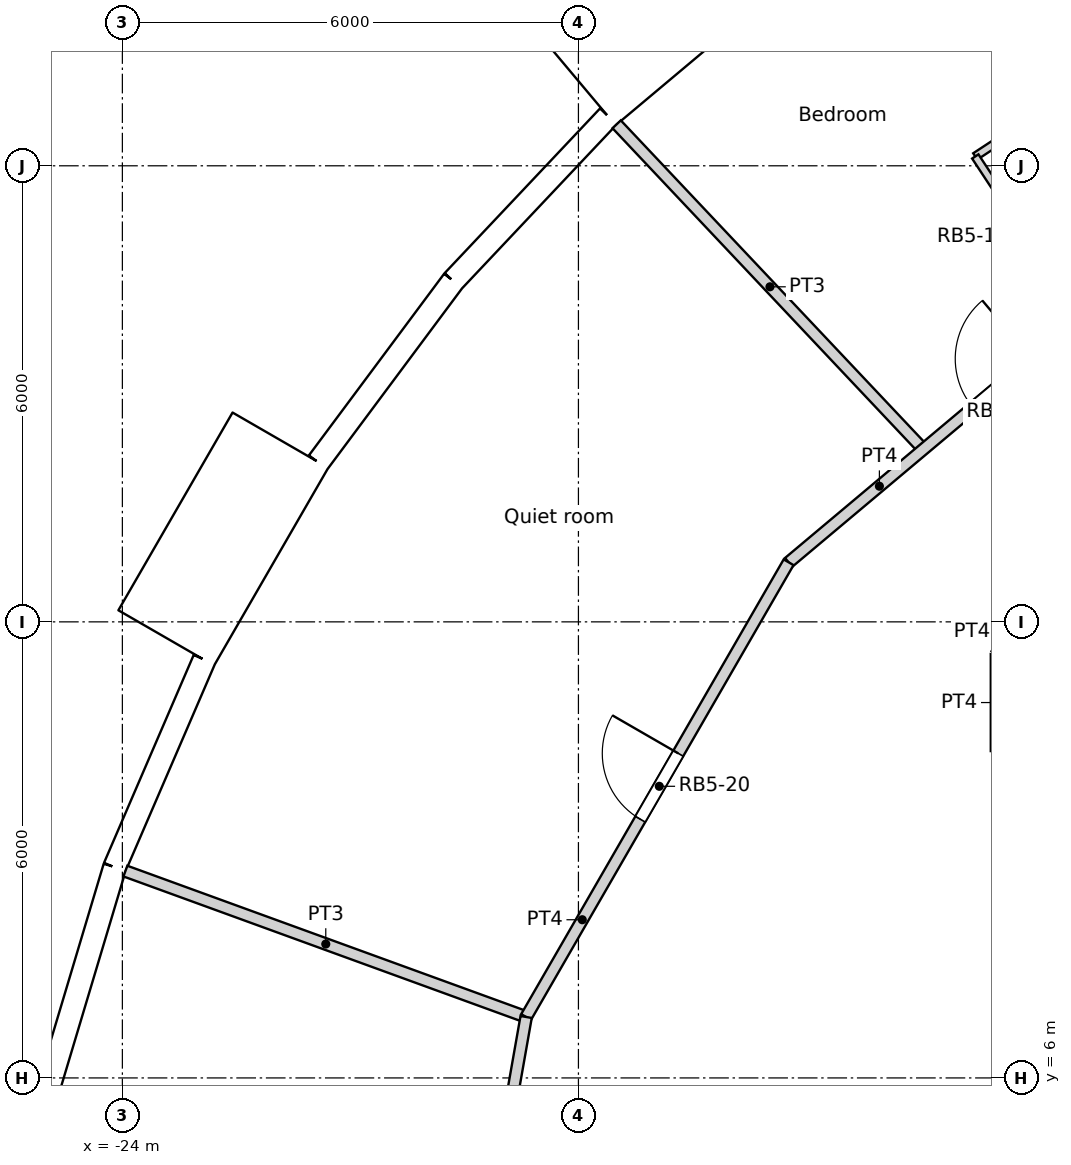
"""IFC4 building model, lengths in metres.
Left out: names, types, materials, properties, quantities, classifications, styles, units other than length and angle.
Written with IfcOpenShell. Run it as: python <this file> out.ifc"""

import sys

from ifc_helpers import new_model, si_unit, direction, frame, frame_2d, origin, origin_2d, place, context, subcontext, project, spatial, rectangle, circle, extrude, element, fill, save


model = new_model("IFC4")
c1 = context("Model", 3, precision=1e-05, world=origin(), true_north=direction((0.0, 1.0)))
c2 = subcontext(c1, "Body", "Model", "MODEL_VIEW")
j1 = project(units=[si_unit("LENGTHUNIT", "METRE"), si_unit("PLANEANGLEUNIT", "RADIAN")], contexts=[c1])
p1 = place(None, origin())
s1 = spatial("IfcSite", under=j1, at=p1, CompositionType="ELEMENT")
p2 = place(p1, origin())
s2 = spatial("IfcBuilding", under=s1, at=p2, CompositionType="ELEMENT")
p3 = place(p2, frame((0.0, 0.0, 169.2)))
s3 = spatial("IfcBuildingStorey", under=s2, at=p3, CompositionType="ELEMENT", Elevation=169.2)
for number, where, z_axis, x_axis in (
    (1, (-16.846, 17.855, 0.0), (0.0, 0.0, 1.0), (1.0, 0.0, 0.0)),
    (2, (-20.509, 13.489, 0.0), (0.0, 0.0, 1.0), (1.0, 0.0, 0.0)),
    (3, (-23.067, 8.396, 0.0), (0.0, 0.0, 1.0), (1.0, 0.0, 0.0)),
):
    element("IfcColumn", number, at=place(p3, frame(where, z_axis=z_axis, x_axis=x_axis)), inside=s3, PredefinedType="COLUMN", context=c2, shape_type="SweptSolid", body=[
        extrude(circle(Radius=0.6, at=origin_2d()), origin(), (0.0, 0.0, 1.0), 3.6),
    ])
for number, where, z_axis, x_axis in (
    (4, (-13.798, 12.802, 0.0), (0.0, 0.0, 1.0), (1.0, 0.0, 0.0)),
    (5, (-16.958, 8.167, 0.0), (0.0, 0.0, 1.0), (1.0, 0.0, 0.0)),
):
    element("IfcColumn", number, at=place(p3, frame(where, z_axis=z_axis, x_axis=x_axis)), inside=s3, PredefinedType="COLUMN", context=c2, shape_type="SweptSolid", body=[
        extrude(circle(Radius=0.65, at=origin_2d()), origin(), (0.0, 0.0, 1.0), 3.6),
    ])
p4 = place(p3, frame((-15.678, 21.019, -0.3), z_axis=(0.0, 0.0, 1.0), x_axis=(-0.766022196139, -0.642814121673, 0.0)))
e6 = element("IfcWall", 6, at=p4, inside=s3, PredefinedType="ELEMENTEDWALL", context=c2, shape_type="SweptSolid", body=[
    extrude(rectangle(XDim=3.0, YDim=1.45, at=frame_2d((1.5, 0.0))), origin(), (0.0, 0.0, 1.0), 3.6),
])
p5 = place(p4, frame((1.5, 0.0, 1.85)))
e7 = element("IfcOpeningElement", 7, at=p5, cuts=e6, PredefinedType="OPENING", context=c2, shape_type="SweptSolid", body=[
    extrude(circle(Radius=0.9, at=origin_2d()), frame((0.0, 0.735, 0.0), z_axis=(0.0, -1.0, 0.0), x_axis=(1.0, 0.0, 0.0)), (0.0, 0.0, 1.0), 1.47),
])
p6 = place(p3, frame((-17.607, 18.648, 0.0), z_axis=(0.0, 0.0, 1.0), x_axis=(-0.686235184166, -0.727379730273, 0.0)))
e8 = element("IfcWall", 8, at=p6, inside=s3, PredefinedType="SOLIDWALL", context=c2, shape_type="SweptSolid", body=[
    extrude(rectangle(XDim=2.973, YDim=0.3, at=frame_2d((1.486, 0.0))), origin(), (0.0, 0.0, 1.0), 3.3),
])
p7 = place(p6, frame((1.486, 0.0, 1.55)))
e9 = element("IfcOpeningElement", 9, at=p7, cuts=e8, PredefinedType="OPENING", context=c2, shape_type="SweptSolid", body=[
    extrude(circle(Radius=0.9, at=origin_2d()), frame((0.0, 0.16, 0.0), z_axis=(0.0, -1.0, 0.0), x_axis=(1.0, 0.0, 0.0)), (0.0, 0.0, 1.0), 0.32),
])
p8 = place(p3, frame((-19.647, 16.486, 0.0), z_axis=(0.0, 0.0, 1.0), x_axis=(-0.597197580538, -0.80209416517, 0.0)))
e10 = element("IfcWall", 10, at=p8, inside=s3, PredefinedType="SOLIDWALL", context=c2, shape_type="SweptSolid", body=[
    extrude(rectangle(XDim=2.973, YDim=0.3, at=frame_2d((1.486, 0.0))), origin(), (0.0, 0.0, 1.0), 3.3),
])
p9 = place(p8, frame((1.486, 0.0, 1.55)))
e11 = element("IfcOpeningElement", 11, at=p9, cuts=e10, PredefinedType="OPENING", context=c2, shape_type="SweptSolid", body=[
    extrude(circle(Radius=0.9, at=origin_2d()), frame((0.0, 0.16, 0.0), z_axis=(0.0, -1.0, 0.0), x_axis=(1.0, 0.0, 0.0)), (0.0, 0.0, 1.0), 0.32),
])
p10 = place(p3, frame((-21.922, 14.389, -0.3), z_axis=(0.0, 0.0, 1.0), x_axis=(-0.499990139034, -0.866031096941, 0.0)))
e12 = element("IfcWall", 12, at=p10, inside=s3, PredefinedType="ELEMENTEDWALL", context=c2, shape_type="SweptSolid", body=[
    extrude(rectangle(XDim=3.0, YDim=1.45, at=frame_2d((1.5, 0.0))), origin(), (0.0, 0.0, 1.0), 3.6),
])
p11 = place(p10, frame((1.5, 0.0, 1.85)))
e13 = element("IfcOpeningElement", 13, at=p11, cuts=e12, PredefinedType="OPENING", context=c2, shape_type="SweptSolid", body=[
    extrude(circle(Radius=0.9, at=origin_2d()), frame((0.0, 0.735, 0.0), z_axis=(0.0, -1.0, 0.0), x_axis=(1.0, 0.0, 0.0)), (0.0, 0.0, 1.0), 1.47),
])
p12 = place(p3, frame((-22.923, 11.502, 0.0), z_axis=(0.0, 0.0, 1.0), x_axis=(-0.396148129016, -0.918186614952, 0.0)))
e14 = element("IfcWall", 14, at=p12, inside=s3, PredefinedType="SOLIDWALL", context=c2, shape_type="SweptSolid", body=[
    extrude(rectangle(XDim=2.973, YDim=0.3, at=frame_2d((1.486, 0.0))), origin(), (0.0, 0.0, 1.0), 3.3),
])
p13 = place(p12, frame((1.486, 0.0, 1.55)))
e15 = element("IfcOpeningElement", 15, at=p13, cuts=e14, PredefinedType="OPENING", context=c2, shape_type="SweptSolid", body=[
    extrude(circle(Radius=0.9, at=origin_2d()), frame((0.0, 0.16, 0.0), z_axis=(0.0, -1.0, 0.0), x_axis=(1.0, 0.0, 0.0)), (0.0, 0.0, 1.0), 0.32),
])
p14 = place(p3, frame((-24.101, 8.772, 0.0), z_axis=(0.0, 0.0, 1.0), x_axis=(-0.286782750849, -0.957995643944, 0.0)))
e16 = element("IfcWall", 16, at=p14, inside=s3, PredefinedType="SOLIDWALL", context=c2, shape_type="SweptSolid", body=[
    extrude(rectangle(XDim=2.973, YDim=0.3, at=frame_2d((1.486, 0.0))), origin(), (0.0, 0.0, 1.0), 3.3),
])
p15 = place(p14, frame((1.486, 0.0, 1.55)))
e17 = element("IfcOpeningElement", 17, at=p15, cuts=e16, PredefinedType="OPENING", context=c2, shape_type="SweptSolid", body=[
    extrude(circle(Radius=0.9, at=origin_2d()), frame((0.0, 0.16, 0.0), z_axis=(0.0, -1.0, 0.0), x_axis=(1.0, 0.0, 0.0)), (0.0, 0.0, 1.0), 0.32),
])
p16 = place(p3, frame((-25.521, 6.023, -0.3), z_axis=(0.0, 0.0, 1.0), x_axis=(-0.173669267716, -0.984804034035, 0.0)))
e18 = element("IfcWall", 18, at=p16, inside=s3, PredefinedType="ELEMENTEDWALL", context=c2, shape_type="SweptSolid", body=[
    extrude(rectangle(XDim=3.0, YDim=1.45, at=frame_2d((1.5, 0.0))), origin(), (0.0, 0.0, 1.0), 3.6),
])
p17 = place(p16, frame((1.5, 0.0, 1.85)))
e19 = element("IfcOpeningElement", 19, at=p17, cuts=e18, PredefinedType="OPENING", context=c2, shape_type="SweptSolid", body=[
    extrude(circle(Radius=0.9, at=origin_2d()), frame((0.0, 0.735, 0.0), z_axis=(0.0, -1.0, 0.0), x_axis=(1.0, 0.0, 0.0)), (0.0, 0.0, 1.0), 1.47),
])
p18 = place(p3, frame((-15.234, 12.783, 0.0), z_axis=(0.0, 0.0, 1.0), x_axis=(0.765918610974, 0.642937540795, 0.0)))
e20 = element("IfcWall", 20, at=p18, inside=s3, PredefinedType="PARTITIONING", context=c2, shape_type="SweptSolid", body=[
    extrude(rectangle(XDim=6.906, YDim=0.15, at=frame_2d((3.453, 0.0))), origin(), (0.0, 0.0, 1.0), 3.3),
])
p19 = place(p18, frame((3.167, 0.0, 0.0)))
e21 = element("IfcOpeningElement", 21, at=p19, cuts=e20, PredefinedType="OPENING", context=c2, shape_type="SweptSolid", body=[
    extrude(rectangle(XDim=1.0, YDim=2.1, at=frame_2d((0.5, 1.05))), frame((0.0, 0.075, 0.0), z_axis=(0.0, -1.0, 0.0), x_axis=(1.0, 0.0, 0.0)), (0.0, 0.0, 1.0), 0.15),
])
p20 = place(p3, frame((-12.5, 10.3, 0.0), z_axis=(0.0, 0.0, 1.0), x_axis=(0.0, 1.0, 0.0)))
e22 = element("IfcWall", 22, at=p20, inside=s3, PredefinedType="PARTITIONING", context=c2, shape_type="SweptSolid", body=[
    extrude(rectangle(XDim=1.277, YDim=0.15, at=frame_2d((0.638, 0.0))), origin(), (0.0, 0.0, 1.0), 3.3),
])
p21 = place(p3, frame((-18.688, 6.802, 0.0), z_axis=(0.0, 0.0, 1.0), x_axis=(0.499914202267, 0.866074933462, 0.0)))
e23 = element("IfcWall", 23, at=p21, inside=s3, PredefinedType="PARTITIONING", context=c2, shape_type="SweptSolid", body=[
    extrude(rectangle(XDim=6.907, YDim=0.15, at=frame_2d((3.454, 0.0))), origin(), (0.0, 0.0, 1.0), 3.3),
])
p22 = place(p21, frame((3.004, 0.0, 0.0)))
e24 = element("IfcOpeningElement", 24, at=p22, cuts=e23, PredefinedType="OPENING", context=c2, shape_type="SweptSolid", body=[
    extrude(rectangle(XDim=1.0, YDim=2.04, at=frame_2d((0.5, 1.02))), frame((0.0, 0.075, 0.0), z_axis=(0.0, -1.0, 0.0), x_axis=(1.0, 0.0, 0.0)), (0.0, 0.0, 1.0), 0.15),
])
p23 = place(p3, frame((-19.888, 0.0, 0.0), z_axis=(0.0, 0.0, 1.0), x_axis=(0.173728873845, 0.98479352069, 0.0)))
e25 = element("IfcWall", 25, at=p23, inside=s3, PredefinedType="PARTITIONING", context=c2, shape_type="SweptSolid", body=[
    extrude(rectangle(XDim=6.907, YDim=0.15, at=frame_2d((3.454, 0.0))), origin(), (0.0, 0.0, 1.0), 3.3),
])
p24 = place(p3, frame((-12.749, 22.081, 0.0), z_axis=(0.0, 0.0, 1.0), x_axis=(0.500061505771, -0.865989890499, 0.0)))
e26 = element("IfcWall", 26, at=p24, inside=s3, PredefinedType="PARTITIONING", context=c2, shape_type="SweptSolid", body=[
    extrude(rectangle(XDim=5.61, YDim=0.15, at=frame_2d((2.805, 0.0))), origin(), (0.0, 0.0, 1.0), 3.3),
])
p25 = place(p3, frame((-12.779, 18.123, 0.0), z_axis=(0.0, 0.0, 1.0), x_axis=(0.835400926368, 0.549641057622, 0.0)))
e27 = element("IfcWall", 27, at=p25, inside=s3, PredefinedType="PARTITIONING", context=c2, shape_type="SweptSolid", body=[
    extrude(rectangle(XDim=2.009, YDim=0.1, at=frame_2d((1.004, 0.0))), origin(), (0.0, 0.0, 1.0), 3.3),
])
p26 = place(p3, frame((-12.779, 18.123, 0.0), z_axis=(0.0, 0.0, 1.0), x_axis=(0.549788507485, -0.835303895021, 0.0)))
e28 = element("IfcWall", 28, at=p26, inside=s3, PredefinedType="PARTITIONING", context=c2, shape_type="SweptSolid", body=[
    extrude(rectangle(XDim=2.529, YDim=0.1, at=frame_2d((1.264, 0.0))), origin(), (0.0, 0.0, 1.0), 3.3),
])
p27 = place(p26, frame((0.814, 0.0, 0.0)))
e29 = element("IfcOpeningElement", 29, at=p27, cuts=e28, PredefinedType="OPENING", context=c2, shape_type="SweptSolid", body=[
    extrude(rectangle(XDim=0.9, YDim=2.04, at=frame_2d((0.45, 1.02))), frame((0.0, 0.05, 0.0), z_axis=(0.0, -1.0, 0.0), x_axis=(1.0, 0.0, 0.0)), (0.0, 0.0, 1.0), 0.1),
])
p28 = place(p3, frame((-17.497, 18.546, 0.0), z_axis=(0.0, 0.0, 1.0), x_axis=(0.6862502776, -0.72736549031, 0.0)))
e30 = element("IfcWall", 30, at=p28, inside=s3, PredefinedType="PARTITIONING", context=c2, shape_type="SweptSolid", body=[
    extrude(rectangle(XDim=5.879, YDim=0.15, at=frame_2d((2.939, 0.0))), origin(), (0.0, 0.0, 1.0), 3.3),
])
p29 = place(p3, frame((-23.96, 8.721, 0.0), z_axis=(0.0, 0.0, 1.0), x_axis=(0.939686652043, -0.342036541866, 0.0)))
e31 = element("IfcWall", 31, at=p29, inside=s3, PredefinedType="PARTITIONING", context=c2, shape_type="SweptSolid", body=[
    extrude(rectangle(XDim=5.61, YDim=0.15, at=frame_2d((2.805, 0.0))), origin(), (0.0, 0.0, 1.0), 3.3),
])
p30 = place(p5, origin())
e32 = element("IfcWindow", 32, at=p30, inside=s3, PartitioningType="SINGLE_PANEL", PredefinedType="WINDOW", context=c2, shape_type="SweptSolid", body=[
    extrude(circle(Radius=0.9, at=origin_2d()), frame((0.0, 0.695, 0.0), z_axis=(0.0, -1.0, 0.0), x_axis=(1.0, 0.0, 0.0)), (0.0, 0.0, 1.0), 0.1),
])
fill(e7, e32)
p31 = place(p7, origin())
e33 = element("IfcWindow", 33, at=p31, inside=s3, PartitioningType="SINGLE_PANEL", PredefinedType="WINDOW", context=c2, shape_type="SweptSolid", body=[
    extrude(circle(Radius=0.9, at=origin_2d()), frame((0.0, 0.12, 0.0), z_axis=(0.0, -1.0, 0.0), x_axis=(1.0, 0.0, 0.0)), (0.0, 0.0, 1.0), 0.1),
])
fill(e9, e33)
p32 = place(p9, origin())
e34 = element("IfcWindow", 34, at=p32, inside=s3, PartitioningType="SINGLE_PANEL", PredefinedType="WINDOW", context=c2, shape_type="SweptSolid", body=[
    extrude(circle(Radius=0.9, at=origin_2d()), frame((0.0, 0.12, 0.0), z_axis=(0.0, -1.0, 0.0), x_axis=(1.0, 0.0, 0.0)), (0.0, 0.0, 1.0), 0.1),
])
fill(e11, e34)
p33 = place(p11, origin())
e35 = element("IfcWindow", 35, at=p33, inside=s3, PartitioningType="SINGLE_PANEL", PredefinedType="WINDOW", context=c2, shape_type="SweptSolid", body=[
    extrude(circle(Radius=0.9, at=origin_2d()), frame((0.0, 0.695, 0.0), z_axis=(0.0, -1.0, 0.0), x_axis=(1.0, 0.0, 0.0)), (0.0, 0.0, 1.0), 0.1),
])
fill(e13, e35)
p34 = place(p13, origin())
e36 = element("IfcWindow", 36, at=p34, inside=s3, PartitioningType="SINGLE_PANEL", PredefinedType="WINDOW", context=c2, shape_type="SweptSolid", body=[
    extrude(circle(Radius=0.9, at=origin_2d()), frame((0.0, 0.12, 0.0), z_axis=(0.0, -1.0, 0.0), x_axis=(1.0, 0.0, 0.0)), (0.0, 0.0, 1.0), 0.1),
])
fill(e15, e36)
p35 = place(p15, origin())
e37 = element("IfcWindow", 37, at=p35, inside=s3, PartitioningType="SINGLE_PANEL", PredefinedType="WINDOW", context=c2, shape_type="SweptSolid", body=[
    extrude(circle(Radius=0.9, at=origin_2d()), frame((0.0, 0.12, 0.0), z_axis=(0.0, -1.0, 0.0), x_axis=(1.0, 0.0, 0.0)), (0.0, 0.0, 1.0), 0.1),
])
fill(e17, e37)
p36 = place(p19, origin())
e38 = element("IfcDoor", 38, at=p36, inside=s3, OperationType="SINGLE_SWING_RIGHT", PredefinedType="DOOR", context=c2, shape_type="SweptSolid", body=[
    extrude(rectangle(XDim=1.0, YDim=2.1, at=frame_2d((0.5, 1.05))), frame((0.0, 0.025, 0.0), z_axis=(0.0, -1.0, 0.0), x_axis=(1.0, 0.0, 0.0)), (0.0, 0.0, 1.0), 0.05),
])
fill(e21, e38)
p37 = place(p22, origin())
e39 = element("IfcDoor", 39, at=p37, inside=s3, OperationType="SINGLE_SWING_RIGHT", PredefinedType="DOOR", context=c2, shape_type="SweptSolid", body=[
    extrude(rectangle(XDim=1.0, YDim=2.04, at=frame_2d((0.5, 1.02))), frame((0.0, 0.025, 0.0), z_axis=(0.0, -1.0, 0.0), x_axis=(1.0, 0.0, 0.0)), (0.0, 0.0, 1.0), 0.05),
])
fill(e24, e39)
save(model, sys.argv[1])
